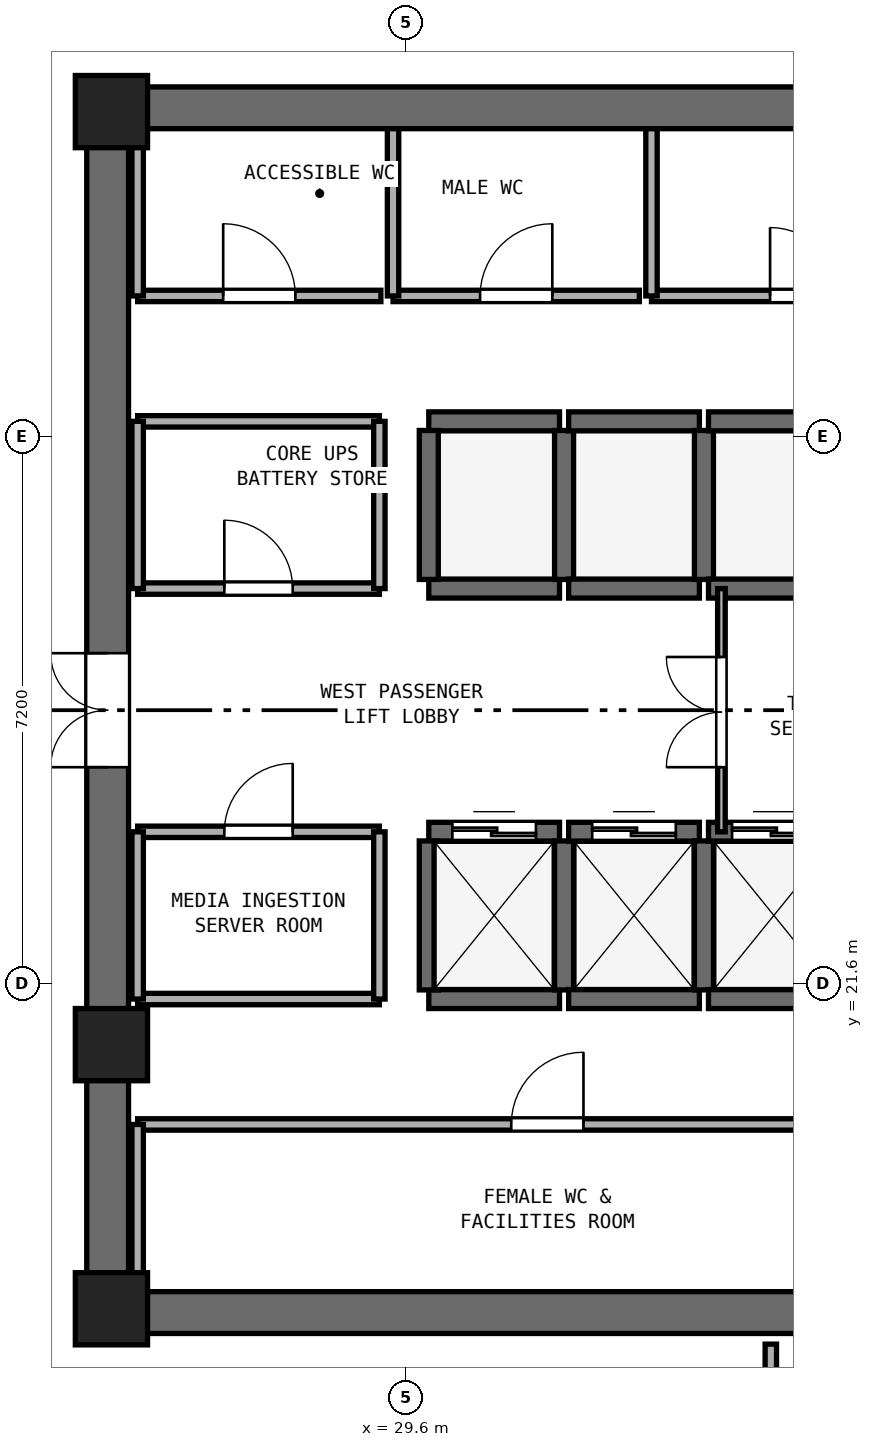
"""IFC4 building model, lengths in metres.
Left out: names, types, materials, properties, quantities, classifications, styles, units other than length and angle.
Written with IfcOpenShell. Run it as: python <this file> out.ifc"""

import sys

from ifc_helpers import new_model, si_unit, direction, frame, frame_2d, origin, origin_2d, place, context, subcontext, project, spatial, rectangle, extrude, element, fill, save


model = new_model("IFC4")
c1 = context("Model", 3, precision=1e-05, world=origin(), true_north=direction((0.0, 1.0)))
c2 = subcontext(c1, "Body", "Model", "MODEL_VIEW")
j1 = project(units=[si_unit("LENGTHUNIT", "METRE"), si_unit("PLANEANGLEUNIT", "RADIAN")], contexts=[c1])
p1 = place(None, origin())
s1 = spatial("IfcSite", under=j1, at=p1, CompositionType="ELEMENT")
p2 = place(p1, origin())
s2 = spatial("IfcBuilding", under=s1, at=p2, CompositionType="ELEMENT")
p3 = place(p2, frame((0.0, 0.0, 140.2)))
s3 = spatial("IfcBuildingStorey", under=s2, at=p3, CompositionType="ELEMENT", Elevation=140.2)
for number, where, z_axis, x_axis in (
    (1, (25.4, 17.275, 0.0), (0.0, 0.0, 1.0), (1.0, 0.0, 0.0)),
    (2, (25.4, 33.125, 0.0), (0.0, 0.0, 1.0), (1.0, 0.0, 0.0)),
):
    element("IfcWall", number, at=place(p3, frame(where, z_axis=z_axis, x_axis=x_axis)), inside=s3, PredefinedType="SHEAR", context=c2, shape_type="SweptSolid", body=[
        extrude(rectangle(XDim=23.2, YDim=0.55, at=frame_2d((11.6, 0.0))), origin(), (0.0, 0.0, 1.0), 3.54),
    ])
p4 = place(p3, frame((25.675, 17.55, 0.0), z_axis=(0.0, 0.0, 1.0), x_axis=(0.0, 1.0, 0.0)))
e3 = element("IfcWall", 3, at=p4, inside=s3, PredefinedType="SHEAR", context=c2, shape_type="SweptSolid", body=[
    extrude(rectangle(XDim=15.3, YDim=0.55, at=frame_2d((7.65, 0.0))), origin(), (0.0, 0.0, 1.0), 3.54),
])
p5 = place(p4, frame((6.9, 0.0, 0.0)))
e4 = element("IfcOpeningElement", 4, at=p5, cuts=e3, PredefinedType="OPENING", context=c2, shape_type="SweptSolid", body=[
    extrude(rectangle(XDim=1.5, YDim=2.15, at=frame_2d((0.75, 1.075))), frame((0.0, 0.285, 0.0), z_axis=(0.0, -1.0, 0.0), x_axis=(1.0, 0.0, 0.0)), (0.0, 0.0, 1.0), 0.57),
])
for number, where, z_axis, x_axis in (
    (5, (25.725, 17.325, 0.0), (0.0, 0.0, 1.0), (1.0, 0.0, 0.0)),
    (6, (25.725, 33.075, 0.0), (0.0, 0.0, 1.0), (1.0, 0.0, 0.0)),
    (7, (25.725, 20.8, 0.0), (0.0, 0.0, 1.0), (1.0, 0.0, 0.0)),
):
    element("IfcColumn", number, at=place(p3, frame(where, z_axis=z_axis, x_axis=x_axis)), inside=s3, PredefinedType="PILASTER", context=c2, shape_type="SweptSolid", body=[
        extrude(rectangle(XDim=0.95, YDim=0.95, at=origin_2d()), origin(), (0.0, 0.0, 1.0), 3.8),
    ])
p6 = place(p3, frame((29.9, 21.4, 0.0), z_axis=(0.0, 0.0, 1.0), x_axis=(1.0, 0.0, 0.0)))
e8 = element("IfcWall", 8, at=p6, inside=s3, PredefinedType="SHEAR", context=c2, shape_type="SweptSolid", body=[
    extrude(rectangle(XDim=1.72, YDim=0.25, at=frame_2d((0.86, 0.0))), origin(), (0.0, 0.0, 1.0), 3.54),
])
p7 = place(p3, frame((29.9, 23.6, 0.0), z_axis=(0.0, 0.0, 1.0), x_axis=(1.0, 0.0, 0.0)))
e9 = element("IfcWall", 9, at=p7, inside=s3, PredefinedType="SHEAR", context=c2, shape_type="SweptSolid", body=[
    extrude(rectangle(XDim=1.72, YDim=0.25, at=frame_2d((0.86, 0.0))), origin(), (0.0, 0.0, 1.0), 3.54),
])
p8 = place(p7, frame((0.31, 0.0, 0.0)))
e10 = element("IfcOpeningElement", 10, at=p8, cuts=e9, PredefinedType="OPENING", context=c2, shape_type="SweptSolid", body=[
    extrude(rectangle(XDim=1.1, YDim=2.15, at=frame_2d((0.55, 1.075))), frame((0.0, 0.135, 0.0), z_axis=(0.0, -1.0, 0.0), x_axis=(1.0, 0.0, 0.0)), (0.0, 0.0, 1.0), 0.27),
])
for number, where, z_axis, x_axis in (
    (11, (29.9, 21.52, 0.0), (0.0, 0.0, 1.0), (0.0, 1.0, 0.0)),
    (12, (31.68, 21.52, 0.0), (0.0, 0.0, 1.0), (0.0, 1.0, 0.0)),
):
    element("IfcWall", number, at=place(p3, frame(where, z_axis=z_axis, x_axis=x_axis)), inside=s3, PredefinedType="SHEAR", context=c2, shape_type="SweptSolid", body=[
        extrude(rectangle(XDim=1.96, YDim=0.25, at=frame_2d((0.98, 0.0))), origin(), (0.0, 0.0, 1.0), 3.54),
    ])
p9 = place(p3, frame((31.74, 21.4, 0.0), z_axis=(0.0, 0.0, 1.0), x_axis=(1.0, 0.0, 0.0)))
e13 = element("IfcWall", 13, at=p9, inside=s3, PredefinedType="SHEAR", context=c2, shape_type="SweptSolid", body=[
    extrude(rectangle(XDim=1.72, YDim=0.25, at=frame_2d((0.86, 0.0))), origin(), (0.0, 0.0, 1.0), 3.54),
])
p10 = place(p3, frame((31.74, 23.6, 0.0), z_axis=(0.0, 0.0, 1.0), x_axis=(1.0, 0.0, 0.0)))
e14 = element("IfcWall", 14, at=p10, inside=s3, PredefinedType="SHEAR", context=c2, shape_type="SweptSolid", body=[
    extrude(rectangle(XDim=1.72, YDim=0.25, at=frame_2d((0.86, 0.0))), origin(), (0.0, 0.0, 1.0), 3.54),
])
p11 = place(p10, frame((0.31, 0.0, 0.0)))
e15 = element("IfcOpeningElement", 15, at=p11, cuts=e14, PredefinedType="OPENING", context=c2, shape_type="SweptSolid", body=[
    extrude(rectangle(XDim=1.1, YDim=2.15, at=frame_2d((0.55, 1.075))), frame((0.0, 0.135, 0.0), z_axis=(0.0, -1.0, 0.0), x_axis=(1.0, 0.0, 0.0)), (0.0, 0.0, 1.0), 0.27),
])
p12 = place(p3, frame((33.52, 21.52, 0.0), z_axis=(0.0, 0.0, 1.0), x_axis=(0.0, 1.0, 0.0)))
e16 = element("IfcWall", 16, at=p12, inside=s3, PredefinedType="SHEAR", context=c2, shape_type="SweptSolid", body=[
    extrude(rectangle(XDim=1.96, YDim=0.25, at=frame_2d((0.98, 0.0))), origin(), (0.0, 0.0, 1.0), 3.54),
])
p13 = place(p3, frame((33.58, 21.4, 0.0), z_axis=(0.0, 0.0, 1.0), x_axis=(1.0, 0.0, 0.0)))
e17 = element("IfcWall", 17, at=p13, inside=s3, PredefinedType="SHEAR", context=c2, shape_type="SweptSolid", body=[
    extrude(rectangle(XDim=1.72, YDim=0.25, at=frame_2d((0.86, 0.0))), origin(), (0.0, 0.0, 1.0), 3.54),
])
p14 = place(p3, frame((33.58, 23.6, 0.0), z_axis=(0.0, 0.0, 1.0), x_axis=(1.0, 0.0, 0.0)))
e18 = element("IfcWall", 18, at=p14, inside=s3, PredefinedType="SHEAR", context=c2, shape_type="SweptSolid", body=[
    extrude(rectangle(XDim=1.72, YDim=0.25, at=frame_2d((0.86, 0.0))), origin(), (0.0, 0.0, 1.0), 3.54),
])
p15 = place(p14, frame((0.31, 0.0, 0.0)))
e19 = element("IfcOpeningElement", 19, at=p15, cuts=e18, PredefinedType="OPENING", context=c2, shape_type="SweptSolid", body=[
    extrude(rectangle(XDim=1.1, YDim=2.15, at=frame_2d((0.55, 1.075))), frame((0.0, 0.135, 0.0), z_axis=(0.0, -1.0, 0.0), x_axis=(1.0, 0.0, 0.0)), (0.0, 0.0, 1.0), 0.27),
])
for number, where, z_axis, x_axis in (
    (20, (29.9, 26.8, 0.0), (0.0, 0.0, 1.0), (1.0, 0.0, 0.0)),
    (21, (29.9, 29.0, 0.0), (0.0, 0.0, 1.0), (1.0, 0.0, 0.0)),
):
    element("IfcWall", number, at=place(p3, frame(where, z_axis=z_axis, x_axis=x_axis)), inside=s3, PredefinedType="SHEAR", context=c2, shape_type="SweptSolid", body=[
        extrude(rectangle(XDim=1.72, YDim=0.25, at=frame_2d((0.86, 0.0))), origin(), (0.0, 0.0, 1.0), 3.54),
    ])
for number, where, z_axis, x_axis in (
    (22, (29.9, 26.92, 0.0), (0.0, 0.0, 1.0), (0.0, 1.0, 0.0)),
    (23, (31.68, 26.92, 0.0), (0.0, 0.0, 1.0), (0.0, 1.0, 0.0)),
):
    element("IfcWall", number, at=place(p3, frame(where, z_axis=z_axis, x_axis=x_axis)), inside=s3, PredefinedType="SHEAR", context=c2, shape_type="SweptSolid", body=[
        extrude(rectangle(XDim=1.96, YDim=0.25, at=frame_2d((0.98, 0.0))), origin(), (0.0, 0.0, 1.0), 3.54),
    ])
for number, where, z_axis, x_axis in (
    (24, (31.74, 26.8, 0.0), (0.0, 0.0, 1.0), (1.0, 0.0, 0.0)),
    (25, (31.74, 29.0, 0.0), (0.0, 0.0, 1.0), (1.0, 0.0, 0.0)),
):
    element("IfcWall", number, at=place(p3, frame(where, z_axis=z_axis, x_axis=x_axis)), inside=s3, PredefinedType="SHEAR", context=c2, shape_type="SweptSolid", body=[
        extrude(rectangle(XDim=1.72, YDim=0.25, at=frame_2d((0.86, 0.0))), origin(), (0.0, 0.0, 1.0), 3.54),
    ])
p16 = place(p3, frame((33.52, 26.92, 0.0), z_axis=(0.0, 0.0, 1.0), x_axis=(0.0, 1.0, 0.0)))
e26 = element("IfcWall", 26, at=p16, inside=s3, PredefinedType="SHEAR", context=c2, shape_type="SweptSolid", body=[
    extrude(rectangle(XDim=1.96, YDim=0.25, at=frame_2d((0.98, 0.0))), origin(), (0.0, 0.0, 1.0), 3.54),
])
for number, where, z_axis, x_axis in (
    (27, (33.58, 26.8, 0.0), (0.0, 0.0, 1.0), (1.0, 0.0, 0.0)),
    (28, (33.58, 29.0, 0.0), (0.0, 0.0, 1.0), (1.0, 0.0, 0.0)),
):
    element("IfcWall", number, at=place(p3, frame(where, z_axis=z_axis, x_axis=x_axis)), inside=s3, PredefinedType="SHEAR", context=c2, shape_type="SweptSolid", body=[
        extrude(rectangle(XDim=1.72, YDim=0.25, at=frame_2d((0.86, 0.0))), origin(), (0.0, 0.0, 1.0), 3.54),
    ])
p17 = place(p3, frame((26.07, 30.65, 0.0), z_axis=(0.0, 0.0, 1.0), x_axis=(1.0, 0.0, 0.0)))
e29 = element("IfcWall", 29, at=p17, inside=s3, PredefinedType="PARTITIONING", context=c2, shape_type="SweptSolid", body=[
    extrude(rectangle(XDim=3.2, YDim=0.15, at=frame_2d((1.6, 0.0))), origin(), (0.0, 0.0, 1.0), 3.54),
])
p18 = place(p17, frame((1.125, 0.0, 0.0)))
e30 = element("IfcOpeningElement", 30, at=p18, cuts=e29, PredefinedType="OPENING", context=c2, shape_type="SweptSolid", body=[
    extrude(rectangle(XDim=0.95, YDim=2.1, at=frame_2d((0.475, 1.05))), frame((0.0, 0.085, 0.0), z_axis=(0.0, -1.0, 0.0), x_axis=(1.0, 0.0, 0.0)), (0.0, 0.0, 1.0), 0.17),
])
p19 = place(p3, frame((26.07, 30.65, 0.0), z_axis=(0.0, 0.0, 1.0), x_axis=(0.0, 1.0, 0.0)))
e31 = element("IfcWall", 31, at=p19, inside=s3, PredefinedType="PARTITIONING", context=c2, shape_type="SweptSolid", body=[
    extrude(rectangle(XDim=2.2, YDim=0.15, at=frame_2d((1.1, 0.0))), origin(), (0.0, 0.0, 1.0), 2.64),
])
p20 = place(p3, frame((29.43, 30.65, 0.0), z_axis=(0.0, 0.0, 1.0), x_axis=(1.0, 0.0, 0.0)))
e32 = element("IfcWall", 32, at=p20, inside=s3, PredefinedType="PARTITIONING", context=c2, shape_type="SweptSolid", body=[
    extrude(rectangle(XDim=3.24, YDim=0.15, at=frame_2d((1.62, 0.0))), origin(), (0.0, 0.0, 1.0), 3.54),
])
p21 = place(p20, frame((1.145, 0.0, 0.0)))
e33 = element("IfcOpeningElement", 33, at=p21, cuts=e32, PredefinedType="OPENING", context=c2, shape_type="SweptSolid", body=[
    extrude(rectangle(XDim=0.95, YDim=2.1, at=frame_2d((0.475, 1.05))), frame((0.0, 0.085, 0.0), z_axis=(0.0, -1.0, 0.0), x_axis=(1.0, 0.0, 0.0)), (0.0, 0.0, 1.0), 0.17),
])
p22 = place(p3, frame((29.43, 30.65, 0.0), z_axis=(0.0, 0.0, 1.0), x_axis=(0.0, 1.0, 0.0)))
e34 = element("IfcWall", 34, at=p22, inside=s3, PredefinedType="PARTITIONING", context=c2, shape_type="SweptSolid", body=[
    extrude(rectangle(XDim=2.2, YDim=0.15, at=frame_2d((1.1, 0.0))), origin(), (0.0, 0.0, 1.0), 3.54),
])
p23 = place(p3, frame((32.83, 30.65, 0.0), z_axis=(0.0, 0.0, 1.0), x_axis=(1.0, 0.0, 0.0)))
e35 = element("IfcWall", 35, at=p23, inside=s3, PredefinedType="PARTITIONING", context=c2, shape_type="SweptSolid", body=[
    extrude(rectangle(XDim=4.02, YDim=0.15, at=frame_2d((2.01, 0.0))), origin(), (0.0, 0.0, 1.0), 3.54),
])
p24 = place(p23, frame((1.56, 0.0, 0.0)))
e36 = element("IfcOpeningElement", 36, at=p24, cuts=e35, PredefinedType="OPENING", context=c2, shape_type="SweptSolid", body=[
    extrude(rectangle(XDim=0.9, YDim=2.1, at=frame_2d((0.45, 1.05))), frame((0.0, 0.085, 0.0), z_axis=(0.0, -1.0, 0.0), x_axis=(1.0, 0.0, 0.0)), (0.0, 0.0, 1.0), 0.17),
])
p25 = place(p3, frame((32.83, 30.65, 0.0), z_axis=(0.0, 0.0, 1.0), x_axis=(0.0, 1.0, 0.0)))
e37 = element("IfcWall", 37, at=p25, inside=s3, PredefinedType="PARTITIONING", context=c2, shape_type="SweptSolid", body=[
    extrude(rectangle(XDim=2.2, YDim=0.15, at=frame_2d((1.1, 0.0))), origin(), (0.0, 0.0, 1.0), 3.54),
])
p26 = place(p3, frame((26.07, 19.75, 0.0), z_axis=(0.0, 0.0, 1.0), x_axis=(1.0, 0.0, 0.0)))
e38 = element("IfcWall", 38, at=p26, inside=s3, PredefinedType="PARTITIONING", context=c2, shape_type="SweptSolid", body=[
    extrude(rectangle(XDim=10.78, YDim=0.15, at=frame_2d((5.39, 0.0))), origin(), (0.0, 0.0, 1.0), 3.54),
])
p27 = place(p26, frame((4.915, 0.0, 0.0)))
e39 = element("IfcOpeningElement", 39, at=p27, cuts=e38, PredefinedType="OPENING", context=c2, shape_type="SweptSolid", body=[
    extrude(rectangle(XDim=0.95, YDim=2.1, at=frame_2d((0.475, 1.05))), frame((0.0, 0.085, 0.0), z_axis=(0.0, -1.0, 0.0), x_axis=(1.0, 0.0, 0.0)), (0.0, 0.0, 1.0), 0.17),
])
p28 = place(p3, frame((26.07, 17.55, 0.0), z_axis=(0.0, 0.0, 1.0), x_axis=(0.0, 1.0, 0.0)))
e40 = element("IfcWall", 40, at=p28, inside=s3, PredefinedType="PARTITIONING", context=c2, shape_type="SweptSolid", body=[
    extrude(rectangle(XDim=2.2, YDim=0.15, at=frame_2d((1.1, 0.0))), origin(), (0.0, 0.0, 1.0), 2.64),
])
p29 = place(p3, frame((26.07, 26.8, 0.0), z_axis=(0.0, 0.0, 1.0), x_axis=(1.0, 0.0, 0.0)))
e41 = element("IfcWall", 41, at=p29, inside=s3, PredefinedType="PARTITIONING", context=c2, shape_type="SweptSolid", body=[
    extrude(rectangle(XDim=3.18, YDim=0.15, at=frame_2d((1.59, 0.0))), origin(), (0.0, 0.0, 1.0), 3.54),
])
p30 = place(p29, frame((1.14, 0.0, 0.0)))
e42 = element("IfcOpeningElement", 42, at=p30, cuts=e41, PredefinedType="OPENING", context=c2, shape_type="SweptSolid", body=[
    extrude(rectangle(XDim=0.9, YDim=2.1, at=frame_2d((0.45, 1.05))), frame((0.0, 0.085, 0.0), z_axis=(0.0, -1.0, 0.0), x_axis=(1.0, 0.0, 0.0)), (0.0, 0.0, 1.0), 0.17),
])
p31 = place(p3, frame((26.07, 29.0, 0.0), z_axis=(0.0, 0.0, 1.0), x_axis=(1.0, 0.0, 0.0)))
e43 = element("IfcWall", 43, at=p31, inside=s3, PredefinedType="PARTITIONING", context=c2, shape_type="SweptSolid", body=[
    extrude(rectangle(XDim=3.18, YDim=0.15, at=frame_2d((1.59, 0.0))), origin(), (0.0, 0.0, 1.0), 3.54),
])
p32 = place(p3, frame((26.07, 26.8, 0.0), z_axis=(0.0, 0.0, 1.0), x_axis=(0.0, 1.0, 0.0)))
e44 = element("IfcWall", 44, at=p32, inside=s3, PredefinedType="PARTITIONING", context=c2, shape_type="SweptSolid", body=[
    extrude(rectangle(XDim=2.2, YDim=0.15, at=frame_2d((1.1, 0.0))), origin(), (0.0, 0.0, 1.0), 2.64),
])
p33 = place(p3, frame((29.25, 26.8, 0.0), z_axis=(0.0, 0.0, 1.0), x_axis=(0.0, 1.0, 0.0)))
e45 = element("IfcWall", 45, at=p33, inside=s3, PredefinedType="PARTITIONING", context=c2, shape_type="SweptSolid", body=[
    extrude(rectangle(XDim=2.2, YDim=0.15, at=frame_2d((1.1, 0.0))), origin(), (0.0, 0.0, 1.0), 3.54),
])
p34 = place(p3, frame((26.07, 21.4, 0.0), z_axis=(0.0, 0.0, 1.0), x_axis=(1.0, 0.0, 0.0)))
e46 = element("IfcWall", 46, at=p34, inside=s3, PredefinedType="PARTITIONING", context=c2, shape_type="SweptSolid", body=[
    extrude(rectangle(XDim=3.18, YDim=0.15, at=frame_2d((1.59, 0.0))), origin(), (0.0, 0.0, 1.0), 3.54),
])
p35 = place(p3, frame((26.07, 23.6, 0.0), z_axis=(0.0, 0.0, 1.0), x_axis=(1.0, 0.0, 0.0)))
e47 = element("IfcWall", 47, at=p35, inside=s3, PredefinedType="PARTITIONING", context=c2, shape_type="SweptSolid", body=[
    extrude(rectangle(XDim=3.18, YDim=0.15, at=frame_2d((1.59, 0.0))), origin(), (0.0, 0.0, 1.0), 3.54),
])
p36 = place(p35, frame((1.14, 0.0, 0.0)))
e48 = element("IfcOpeningElement", 48, at=p36, cuts=e47, PredefinedType="OPENING", context=c2, shape_type="SweptSolid", body=[
    extrude(rectangle(XDim=0.9, YDim=2.1, at=frame_2d((0.45, 1.05))), frame((0.0, 0.085, 0.0), z_axis=(0.0, -1.0, 0.0), x_axis=(1.0, 0.0, 0.0)), (0.0, 0.0, 1.0), 0.17),
])
p37 = place(p3, frame((26.07, 21.4, 0.0), z_axis=(0.0, 0.0, 1.0), x_axis=(0.0, 1.0, 0.0)))
e49 = element("IfcWall", 49, at=p37, inside=s3, PredefinedType="PARTITIONING", context=c2, shape_type="SweptSolid", body=[
    extrude(rectangle(XDim=2.2, YDim=0.15, at=frame_2d((1.1, 0.0))), origin(), (0.0, 0.0, 1.0), 2.64),
])
p38 = place(p3, frame((29.25, 21.4, 0.0), z_axis=(0.0, 0.0, 1.0), x_axis=(0.0, 1.0, 0.0)))
e50 = element("IfcWall", 50, at=p38, inside=s3, PredefinedType="PARTITIONING", context=c2, shape_type="SweptSolid", body=[
    extrude(rectangle(XDim=2.2, YDim=0.15, at=frame_2d((1.1, 0.0))), origin(), (0.0, 0.0, 1.0), 3.54),
])
p39 = place(p3, frame((33.75, 23.6, 0.0), z_axis=(0.0, 0.0, 1.0), x_axis=(0.0, 1.0, 0.0)))
e51 = element("IfcWall", 51, at=p39, inside=s3, PredefinedType="PARTITIONING", context=c2, shape_type="SweptSolid", body=[
    extrude(rectangle(XDim=3.2, YDim=0.1, at=frame_2d((1.6, 0.0))), origin(), (0.0, 0.0, 1.0), 3.54),
])
p40 = place(p39, frame((0.85, 0.0, 0.0)))
e52 = element("IfcOpeningElement", 52, at=p40, cuts=e51, PredefinedType="OPENING", context=c2, shape_type="SweptSolid", body=[
    extrude(rectangle(XDim=1.45, YDim=2.12, at=frame_2d((0.725, 1.06))), frame((0.0, 0.06, 0.0), z_axis=(0.0, -1.0, 0.0), x_axis=(1.0, 0.0, 0.0)), (0.0, 0.0, 1.0), 0.12),
])
p41 = place(p3, frame((34.4, 14.85, 0.0), z_axis=(0.0, 0.0, 1.0), x_axis=(0.0, 1.0, 0.0)))
e53 = element("IfcWall", 53, at=p41, inside=s3, PredefinedType="PARTITIONING", context=c2, shape_type="SweptSolid", body=[
    extrude(rectangle(XDim=2.01, YDim=0.15, at=frame_2d((1.005, 0.0))), origin(), (0.0, 0.0, 1.0), 3.54),
])
p42 = place(p8, origin())
e54 = element("IfcDoor", 54, at=p42, inside=s3, OperationType="DOUBLE_DOOR_SLIDING", PredefinedType="DOOR", context=c2, shape_type="SweptSolid", body=[
    extrude(rectangle(XDim=1.1, YDim=2.15, at=frame_2d((0.55, 1.075))), frame((0.0, 0.025, 0.0), z_axis=(0.0, -1.0, 0.0), x_axis=(1.0, 0.0, 0.0)), (0.0, 0.0, 1.0), 0.05),
])
fill(e10, e54)
p43 = place(p11, origin())
e55 = element("IfcDoor", 55, at=p43, inside=s3, OperationType="DOUBLE_DOOR_SLIDING", PredefinedType="DOOR", context=c2, shape_type="SweptSolid", body=[
    extrude(rectangle(XDim=1.1, YDim=2.15, at=frame_2d((0.55, 1.075))), frame((0.0, 0.025, 0.0), z_axis=(0.0, -1.0, 0.0), x_axis=(1.0, 0.0, 0.0)), (0.0, 0.0, 1.0), 0.05),
])
fill(e15, e55)
p44 = place(p15, origin())
e56 = element("IfcDoor", 56, at=p44, inside=s3, OperationType="DOUBLE_DOOR_SLIDING", PredefinedType="DOOR", context=c2, shape_type="SweptSolid", body=[
    extrude(rectangle(XDim=1.1, YDim=2.15, at=frame_2d((0.55, 1.075))), frame((0.0, 0.025, 0.0), z_axis=(0.0, -1.0, 0.0), x_axis=(1.0, 0.0, 0.0)), (0.0, 0.0, 1.0), 0.05),
])
fill(e19, e56)
p45 = place(p5, origin())
e57 = element("IfcDoor", 57, at=p45, inside=s3, OperationType="DOUBLE_DOOR_SINGLE_SWING", PredefinedType="DOOR", context=c2, shape_type="SweptSolid", body=[
    extrude(rectangle(XDim=1.5, YDim=2.15, at=frame_2d((0.75, 1.075))), frame((0.0, 0.025, 0.0), z_axis=(0.0, -1.0, 0.0), x_axis=(1.0, 0.0, 0.0)), (0.0, 0.0, 1.0), 0.05),
])
fill(e4, e57)
p46 = place(p18, origin())
e58 = element("IfcDoor", 58, at=p46, inside=s3, OperationType="SINGLE_SWING_LEFT", PredefinedType="DOOR", context=c2, shape_type="SweptSolid", body=[
    extrude(rectangle(XDim=0.95, YDim=2.1, at=frame_2d((0.475, 1.05))), frame((0.0, 0.025, 0.0), z_axis=(0.0, -1.0, 0.0), x_axis=(1.0, 0.0, 0.0)), (0.0, 0.0, 1.0), 0.05),
])
fill(e30, e58)
p47 = place(p21, origin())
e59 = element("IfcDoor", 59, at=p47, inside=s3, OperationType="SINGLE_SWING_RIGHT", PredefinedType="DOOR", context=c2, shape_type="SweptSolid", body=[
    extrude(rectangle(XDim=0.95, YDim=2.1, at=frame_2d((0.475, 1.05))), frame((0.0, 0.025, 0.0), z_axis=(0.0, -1.0, 0.0), x_axis=(1.0, 0.0, 0.0)), (0.0, 0.0, 1.0), 0.05),
])
fill(e33, e59)
p48 = place(p24, origin())
e60 = element("IfcDoor", 60, at=p48, inside=s3, OperationType="SINGLE_SWING_LEFT", PredefinedType="DOOR", context=c2, shape_type="SweptSolid", body=[
    extrude(rectangle(XDim=0.9, YDim=2.1, at=frame_2d((0.45, 1.05))), frame((0.0, 0.025, 0.0), z_axis=(0.0, -1.0, 0.0), x_axis=(1.0, 0.0, 0.0)), (0.0, 0.0, 1.0), 0.05),
])
fill(e36, e60)
p49 = place(p27, origin())
e61 = element("IfcDoor", 61, at=p49, inside=s3, OperationType="SINGLE_SWING_RIGHT", PredefinedType="DOOR", context=c2, shape_type="SweptSolid", body=[
    extrude(rectangle(XDim=0.95, YDim=2.1, at=frame_2d((0.475, 1.05))), frame((0.0, 0.025, 0.0), z_axis=(0.0, -1.0, 0.0), x_axis=(1.0, 0.0, 0.0)), (0.0, 0.0, 1.0), 0.05),
])
fill(e39, e61)
p50 = place(p30, origin())
e62 = element("IfcDoor", 62, at=p50, inside=s3, OperationType="SINGLE_SWING_LEFT", PredefinedType="DOOR", context=c2, shape_type="SweptSolid", body=[
    extrude(rectangle(XDim=0.9, YDim=2.1, at=frame_2d((0.45, 1.05))), frame((0.0, 0.025, 0.0), z_axis=(0.0, -1.0, 0.0), x_axis=(1.0, 0.0, 0.0)), (0.0, 0.0, 1.0), 0.05),
])
fill(e42, e62)
p51 = place(p36, origin())
e63 = element("IfcDoor", 63, at=p51, inside=s3, OperationType="SINGLE_SWING_RIGHT", PredefinedType="DOOR", context=c2, shape_type="SweptSolid", body=[
    extrude(rectangle(XDim=0.9, YDim=2.1, at=frame_2d((0.45, 1.05))), frame((0.0, 0.025, 0.0), z_axis=(0.0, -1.0, 0.0), x_axis=(1.0, 0.0, 0.0)), (0.0, 0.0, 1.0), 0.05),
])
fill(e48, e63)
p52 = place(p40, origin())
e64 = element("IfcDoor", 64, at=p52, inside=s3, OperationType="DOUBLE_DOOR_SINGLE_SWING", PredefinedType="DOOR", context=c2, shape_type="SweptSolid", body=[
    extrude(rectangle(XDim=1.45, YDim=2.12, at=frame_2d((0.725, 1.06))), frame((0.0, 0.025, 0.0), z_axis=(0.0, -1.0, 0.0), x_axis=(1.0, 0.0, 0.0)), (0.0, 0.0, 1.0), 0.05),
])
fill(e52, e64)
save(model, sys.argv[1])
